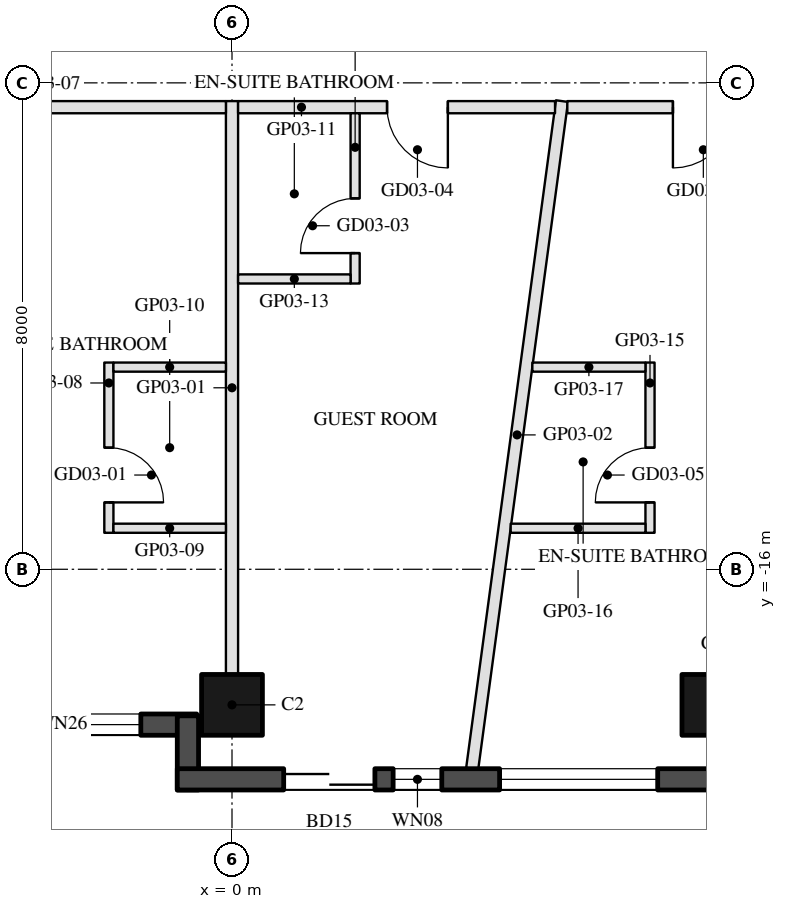
"""IFC4 building model, lengths in metres.
Left out: names, types, materials, properties, quantities, classifications, styles, units other than length and angle.
Written with IfcOpenShell. Run it as: python <this file> out.ifc"""

import sys

from ifc_helpers import new_model, si_unit, direction, frame, frame_2d, origin, origin_2d, place, context, subcontext, project, spatial, rectangle, hollow_rectangle, extrude, element, fill, save


model = new_model("IFC4")
c1 = context("Model", 3, precision=1e-05, world=origin(), true_north=direction((0.0, 1.0)))
c2 = subcontext(c1, "Body", "Model", "MODEL_VIEW")
j1 = project(units=[si_unit("LENGTHUNIT", "METRE"), si_unit("PLANEANGLEUNIT", "RADIAN")], contexts=[c1])
p1 = place(None, origin())
s1 = spatial("IfcSite", under=j1, at=p1, CompositionType="ELEMENT")
p2 = place(p1, origin())
s2 = spatial("IfcBuilding", under=s1, at=p2, CompositionType="ELEMENT")
p3 = place(p2, frame((0.0, 0.0, 68.7)))
s3 = spatial("IfcBuildingStorey", under=s2, at=p3, CompositionType="ELEMENT", Elevation=68.7)
for number, where, z_axis, x_axis in (
    (1, (0.0, -18.23, 0.0), (0.0, 0.0, 1.0), (-1.0, 0.0, 0.0)),
    (2, (7.9, -18.23, 0.0), (0.0, 0.0, 1.0), (-1.0, 0.0, 0.0)),
):
    element("IfcColumn", number, at=place(p3, frame(where, z_axis=z_axis, x_axis=x_axis)), inside=s3, PredefinedType="COLUMN", context=c2, shape_type="SweptSolid", body=[
        extrude(hollow_rectangle(XDim=1.0, YDim=1.0, WallThickness=0.045, at=origin_2d()), origin(), (0.0, 0.0, 1.0), 3.7),
    ])
p4 = place(p3, frame((-7.32, -18.555, 0.0), z_axis=(0.0, 0.0, 1.0), x_axis=(1.0, 0.0, 0.0)))
e3 = element("IfcWall", 3, at=p4, inside=s3, PredefinedType="SOLIDWALL", context=c2, shape_type="SweptSolid", body=[
    extrude(rectangle(XDim=6.74, YDim=0.35, at=frame_2d((3.37, 0.0))), origin(), (0.0, 0.0, 1.0), 3.55),
])
p5 = place(p4, frame((0.32, 0.0, 0.3)))
e4 = element("IfcOpeningElement", 4, at=p5, cuts=e3, PredefinedType="OPENING", context=c2, shape_type="SweptSolid", body=[
    extrude(rectangle(XDim=2.6, YDim=2.65, at=frame_2d((1.3, 1.325))), frame((0.0, 0.185, 0.0), z_axis=(0.0, -1.0, 0.0), x_axis=(1.0, 0.0, 0.0)), (0.0, 0.0, 1.0), 0.37),
])
p6 = place(p4, frame((3.22, 0.0, 0.3)))
e5 = element("IfcOpeningElement", 5, at=p6, cuts=e3, PredefinedType="OPENING", context=c2, shape_type="SweptSolid", body=[
    extrude(rectangle(XDim=2.6, YDim=2.65, at=frame_2d((1.3, 1.325))), frame((0.0, 0.185, 0.0), z_axis=(0.0, -1.0, 0.0), x_axis=(1.0, 0.0, 0.0)), (0.0, 0.0, 1.0), 0.37),
])
p7 = place(p3, frame((-0.725, -18.41, 0.0), z_axis=(0.0, 0.0, 1.0), x_axis=(0.0, -1.0, 0.0)))
e6 = element("IfcWall", 6, at=p7, inside=s3, PredefinedType="SOLIDWALL", context=c2, shape_type="SweptSolid", body=[
    extrude(rectangle(XDim=1.22, YDim=0.35, at=frame_2d((0.61, 0.0))), origin(), (0.0, 0.0, 1.0), 3.55),
])
p8 = place(p3, frame((-0.9, -19.455, 0.0), z_axis=(0.0, 0.0, 1.0), x_axis=(1.0, 0.0, 0.0)))
e7 = element("IfcWall", 7, at=p8, inside=s3, PredefinedType="SOLIDWALL", context=c2, shape_type="SweptSolid", body=[
    extrude(rectangle(XDim=9.7, YDim=0.35, at=frame_2d((4.85, 0.0))), origin(), (0.0, 0.0, 1.0), 3.55),
])
p9 = place(p8, frame((1.75, 0.0, 0.0)))
e8 = element("IfcOpeningElement", 8, at=p9, cuts=e7, PredefinedType="OPENING", context=c2, shape_type="SweptSolid", body=[
    extrude(rectangle(XDim=1.5, YDim=2.4, at=frame_2d((0.75, 1.2))), frame((0.0, 0.185, 0.0), z_axis=(0.0, -1.0, 0.0), x_axis=(1.0, 0.0, 0.0)), (0.0, 0.0, 1.0), 0.37),
])
p10 = place(p8, frame((3.55, 0.0, 0.3)))
e9 = element("IfcOpeningElement", 9, at=p10, cuts=e7, PredefinedType="OPENING", context=c2, shape_type="SweptSolid", body=[
    extrude(rectangle(XDim=0.8, YDim=2.65, at=frame_2d((0.4, 1.325))), frame((0.0, 0.185, 0.0), z_axis=(0.0, -1.0, 0.0), x_axis=(1.0, 0.0, 0.0)), (0.0, 0.0, 1.0), 0.37),
])
p11 = place(p8, frame((5.301, 0.0, 0.3)))
e10 = element("IfcOpeningElement", 10, at=p11, cuts=e7, PredefinedType="OPENING", context=c2, shape_type="SweptSolid", body=[
    extrude(rectangle(XDim=2.6, YDim=2.65, at=frame_2d((1.3, 1.325))), frame((0.0, 0.185, 0.0), z_axis=(0.0, -1.0, 0.0), x_axis=(1.0, 0.0, 0.0)), (0.0, 0.0, 1.0), 0.37),
])
p12 = place(p3, frame((0.0, -17.73, 0.0), z_axis=(0.0, 0.0, 1.0), x_axis=(0.0, 1.0, 0.0)))
e11 = element("IfcWall", 11, at=p12, inside=s3, PredefinedType="PARTITIONING", context=c2, shape_type="SweptSolid", body=[
    extrude(rectangle(XDim=9.43, YDim=0.2, at=frame_2d((4.715, 0.0))), origin(), (0.0, 0.0, 1.0), 2.95),
])
p13 = place(p3, frame((3.95, -19.28, 0.0), z_axis=(0.0, 0.0, 1.0), x_axis=(0.133321271807, 0.991072872439, 0.0)))
e12 = element("IfcWall", 12, at=p13, inside=s3, PredefinedType="PARTITIONING", context=c2, shape_type="SweptSolid", body=[
    extrude(rectangle(XDim=11.079, YDim=0.2, at=frame_2d((5.54, 0.0))), origin(), (0.0, 0.0, 1.0), 2.95),
])
p14 = place(p3, frame((-0.1, -8.4, 0.0), z_axis=(0.0, 0.0, 1.0), x_axis=(-1.0, 0.0, 0.0)))
e13 = element("IfcWall", 13, at=p14, inside=s3, PredefinedType="PARTITIONING", context=c2, shape_type="SweptSolid", body=[
    extrude(rectangle(XDim=9.888, YDim=0.2, at=frame_2d((4.944, 0.0))), origin(), (0.0, 0.0, 1.0), 2.95),
])
p15 = place(p14, frame((4.444, 0.0, 0.0)))
e14 = element("IfcOpeningElement", 14, at=p15, cuts=e13, PredefinedType="OPENING", context=c2, shape_type="SweptSolid", body=[
    extrude(rectangle(XDim=1.0, YDim=2.1, at=frame_2d((0.5, 1.05))), frame((0.0, 0.11, 0.0), z_axis=(0.0, -1.0, 0.0), x_axis=(1.0, 0.0, 0.0)), (0.0, 0.0, 1.0), 0.22),
])
p16 = place(p3, frame((-2.025, -12.6, 0.0), z_axis=(0.0, 0.0, 1.0), x_axis=(0.0, -1.0, 0.0)))
e15 = element("IfcWall", 15, at=p16, inside=s3, PredefinedType="PARTITIONING", context=c2, shape_type="SweptSolid", body=[
    extrude(rectangle(XDim=2.8, YDim=0.15, at=frame_2d((1.4, 0.0))), origin(), (0.0, 0.0, 1.0), 3.55),
])
p17 = place(p16, frame((1.4, 0.0, 0.0)))
e16 = element("IfcOpeningElement", 16, at=p17, cuts=e15, PredefinedType="OPENING", context=c2, shape_type="SweptSolid", body=[
    extrude(rectangle(XDim=0.9, YDim=2.1, at=frame_2d((0.45, 1.05))), frame((0.0, 0.085, 0.0), z_axis=(0.0, -1.0, 0.0), x_axis=(1.0, 0.0, 0.0)), (0.0, 0.0, 1.0), 0.17),
])
for number, where, z_axis, x_axis in (
    (17, (-1.95, -15.325, 0.0), (0.0, 0.0, 1.0), (1.0, 0.0, 0.0)),
    (18, (-1.95, -12.675, 0.0), (0.0, 0.0, 1.0), (1.0, 0.0, 0.0)),
):
    element("IfcWall", number, at=place(p3, frame(where, z_axis=z_axis, x_axis=x_axis)), inside=s3, PredefinedType="PARTITIONING", context=c2, shape_type="SweptSolid", body=[
        extrude(rectangle(XDim=1.85, YDim=0.15, at=frame_2d((0.925, 0.0))), origin(), (0.0, 0.0, 1.0), 2.95),
    ])
p18 = place(p3, frame((5.312, -8.4, 0.0), z_axis=(0.0, 0.0, 1.0), x_axis=(-1.0, 0.0, 0.0)))
e19 = element("IfcWall", 19, at=p18, inside=s3, PredefinedType="PARTITIONING", context=c2, shape_type="SweptSolid", body=[
    extrude(rectangle(XDim=5.212, YDim=0.2, at=frame_2d((2.606, 0.0))), origin(), (0.0, 0.0, 1.0), 2.95),
])
p19 = place(p18, frame((1.763, 0.0, 0.0)))
e20 = element("IfcOpeningElement", 20, at=p19, cuts=e19, PredefinedType="OPENING", context=c2, shape_type="SweptSolid", body=[
    extrude(rectangle(XDim=1.0, YDim=2.1, at=frame_2d((0.5, 1.05))), frame((0.0, 0.11, 0.0), z_axis=(0.0, -1.0, 0.0), x_axis=(1.0, 0.0, 0.0)), (0.0, 0.0, 1.0), 0.22),
])
p20 = place(p3, frame((2.025, -11.3, 0.0), z_axis=(0.0, 0.0, 1.0), x_axis=(0.0, 1.0, 0.0)))
e21 = element("IfcWall", 21, at=p20, inside=s3, PredefinedType="PARTITIONING", context=c2, shape_type="SweptSolid", body=[
    extrude(rectangle(XDim=2.8, YDim=0.15, at=frame_2d((1.4, 0.0))), origin(), (0.0, 0.0, 1.0), 3.55),
])
p21 = place(p20, frame((0.5, 0.0, 0.0)))
e22 = element("IfcOpeningElement", 22, at=p21, cuts=e21, PredefinedType="OPENING", context=c2, shape_type="SweptSolid", body=[
    extrude(rectangle(XDim=0.9, YDim=2.1, at=frame_2d((0.45, 1.05))), frame((0.0, 0.085, 0.0), z_axis=(0.0, -1.0, 0.0), x_axis=(1.0, 0.0, 0.0)), (0.0, 0.0, 1.0), 0.17),
])
p22 = place(p3, frame((0.1, -11.225, 0.0), z_axis=(0.0, 0.0, 1.0), x_axis=(1.0, 0.0, 0.0)))
e23 = element("IfcWall", 23, at=p22, inside=s3, PredefinedType="PARTITIONING", context=c2, shape_type="SweptSolid", body=[
    extrude(rectangle(XDim=1.85, YDim=0.15, at=frame_2d((0.925, 0.0))), origin(), (0.0, 0.0, 1.0), 2.95),
])
p23 = place(p3, frame((9.988, -8.4, 0.0), z_axis=(0.0, 0.0, 1.0), x_axis=(-1.0, 0.0, 0.0)))
e24 = element("IfcWall", 24, at=p23, inside=s3, PredefinedType="PARTITIONING", context=c2, shape_type="SweptSolid", body=[
    extrude(rectangle(XDim=4.474, YDim=0.2, at=frame_2d((2.237, 0.0))), origin(), (0.0, 0.0, 1.0), 2.95),
])
p24 = place(p23, frame((1.737, 0.0, 0.0)))
e25 = element("IfcOpeningElement", 25, at=p24, cuts=e24, PredefinedType="OPENING", context=c2, shape_type="SweptSolid", body=[
    extrude(rectangle(XDim=1.0, YDim=2.1, at=frame_2d((0.5, 1.05))), frame((0.0, 0.11, 0.0), z_axis=(0.0, -1.0, 0.0), x_axis=(1.0, 0.0, 0.0)), (0.0, 0.0, 1.0), 0.22),
])
p25 = place(p3, frame((6.875, -15.4, 0.0), z_axis=(0.0, 0.0, 1.0), x_axis=(0.0, 1.0, 0.0)))
e26 = element("IfcWall", 26, at=p25, inside=s3, PredefinedType="PARTITIONING", context=c2, shape_type="SweptSolid", body=[
    extrude(rectangle(XDim=2.8, YDim=0.15, at=frame_2d((1.4, 0.0))), origin(), (0.0, 0.0, 1.0), 3.55),
])
p26 = place(p25, frame((0.5, 0.0, 0.0)))
e27 = element("IfcOpeningElement", 27, at=p26, cuts=e26, PredefinedType="OPENING", context=c2, shape_type="SweptSolid", body=[
    extrude(rectangle(XDim=0.9, YDim=2.1, at=frame_2d((0.45, 1.05))), frame((0.0, 0.085, 0.0), z_axis=(0.0, -1.0, 0.0), x_axis=(1.0, 0.0, 0.0)), (0.0, 0.0, 1.0), 0.17),
])
p27 = place(p3, frame((4.583, -15.325, 0.0), z_axis=(0.0, 0.0, 1.0), x_axis=(1.0, 0.0, 0.0)))
e28 = element("IfcWall", 28, at=p27, inside=s3, PredefinedType="PARTITIONING", context=c2, shape_type="SweptSolid", body=[
    extrude(rectangle(XDim=2.216, YDim=0.15, at=frame_2d((1.108, 0.0))), origin(), (0.0, 0.0, 1.0), 3.55),
])
p28 = place(p3, frame((4.939, -12.675, 0.0), z_axis=(0.0, 0.0, 1.0), x_axis=(1.0, 0.0, 0.0)))
e29 = element("IfcWall", 29, at=p28, inside=s3, PredefinedType="PARTITIONING", context=c2, shape_type="SweptSolid", body=[
    extrude(rectangle(XDim=1.86, YDim=0.15, at=frame_2d((0.93, 0.0))), origin(), (0.0, 0.0, 1.0), 3.55),
])
p29 = place(p6, origin())
e30 = element("IfcWindow", 30, at=p29, inside=s3, PartitioningType="SINGLE_PANEL", PredefinedType="WINDOW", context=c2, shape_type="SweptSolid", body=[
    extrude(rectangle(XDim=2.6, YDim=2.65, at=frame_2d((1.3, 1.325))), frame((0.0, 0.03, 0.0), z_axis=(0.0, -1.0, 0.0), x_axis=(1.0, 0.0, 0.0)), (0.0, 0.0, 1.0), 0.06),
])
fill(e5, e30)
p30 = place(p9, frame((1.5, 0.0, 0.0), z_axis=(0.0, 0.0, 1.0), x_axis=(-1.0, 0.0, 0.0)))
e31 = element("IfcDoor", 31, at=p30, inside=s3, OperationType="SLIDING_TO_LEFT", PredefinedType="DOOR", context=c2, shape_type="SweptSolid", body=[
    extrude(rectangle(XDim=1.5, YDim=2.4, at=frame_2d((0.75, 1.2))), frame((0.0, 0.025, 0.0), z_axis=(0.0, -1.0, 0.0), x_axis=(1.0, 0.0, 0.0)), (0.0, 0.0, 1.0), 0.05),
])
fill(e8, e31)
p31 = place(p10, origin())
e32 = element("IfcWindow", 32, at=p31, inside=s3, PartitioningType="SINGLE_PANEL", PredefinedType="WINDOW", context=c2, shape_type="SweptSolid", body=[
    extrude(rectangle(XDim=0.8, YDim=2.65, at=frame_2d((0.4, 1.325))), frame((0.0, 0.03, 0.0), z_axis=(0.0, -1.0, 0.0), x_axis=(1.0, 0.0, 0.0)), (0.0, 0.0, 1.0), 0.06),
])
fill(e9, e32)
p32 = place(p11, origin())
e33 = element("IfcWindow", 33, at=p32, inside=s3, PartitioningType="SINGLE_PANEL", PredefinedType="WINDOW", context=c2, shape_type="SweptSolid", body=[
    extrude(rectangle(XDim=2.6, YDim=2.65, at=frame_2d((1.3, 1.325))), frame((0.0, 0.03, 0.0), z_axis=(0.0, -1.0, 0.0), x_axis=(1.0, 0.0, 0.0)), (0.0, 0.0, 1.0), 0.06),
])
fill(e10, e33)
p33 = place(p17, origin())
e34 = element("IfcDoor", 34, at=p33, inside=s3, OperationType="SINGLE_SWING_RIGHT", PredefinedType="DOOR", context=c2, shape_type="SweptSolid", body=[
    extrude(rectangle(XDim=0.9, YDim=2.1, at=frame_2d((0.45, 1.05))), frame((0.0, 0.025, 0.0), z_axis=(0.0, -1.0, 0.0), x_axis=(1.0, 0.0, 0.0)), (0.0, 0.0, 1.0), 0.05),
])
fill(e16, e34)
p34 = place(p21, origin())
e35 = element("IfcDoor", 35, at=p34, inside=s3, OperationType="SINGLE_SWING_LEFT", PredefinedType="DOOR", context=c2, shape_type="SweptSolid", body=[
    extrude(rectangle(XDim=0.9, YDim=2.1, at=frame_2d((0.45, 1.05))), frame((0.0, 0.025, 0.0), z_axis=(0.0, -1.0, 0.0), x_axis=(1.0, 0.0, 0.0)), (0.0, 0.0, 1.0), 0.05),
])
fill(e22, e35)
p35 = place(p19, origin())
e36 = element("IfcDoor", 36, at=p35, inside=s3, OperationType="SINGLE_SWING_LEFT", PredefinedType="DOOR", context=c2, shape_type="SweptSolid", body=[
    extrude(rectangle(XDim=1.0, YDim=2.1, at=frame_2d((0.5, 1.05))), frame((0.0, 0.025, 0.0), z_axis=(0.0, -1.0, 0.0), x_axis=(1.0, 0.0, 0.0)), (0.0, 0.0, 1.0), 0.05),
])
fill(e20, e36)
p36 = place(p26, origin())
e37 = element("IfcDoor", 37, at=p36, inside=s3, OperationType="SINGLE_SWING_LEFT", PredefinedType="DOOR", context=c2, shape_type="SweptSolid", body=[
    extrude(rectangle(XDim=0.9, YDim=2.1, at=frame_2d((0.45, 1.05))), frame((0.0, 0.025, 0.0), z_axis=(0.0, -1.0, 0.0), x_axis=(1.0, 0.0, 0.0)), (0.0, 0.0, 1.0), 0.05),
])
fill(e27, e37)
p37 = place(p24, origin())
e38 = element("IfcDoor", 38, at=p37, inside=s3, OperationType="SINGLE_SWING_RIGHT", PredefinedType="DOOR", context=c2, shape_type="SweptSolid", body=[
    extrude(rectangle(XDim=1.0, YDim=2.1, at=frame_2d((0.5, 1.05))), frame((0.0, 0.025, 0.0), z_axis=(0.0, -1.0, 0.0), x_axis=(1.0, 0.0, 0.0)), (0.0, 0.0, 1.0), 0.05),
])
fill(e25, e38)
save(model, sys.argv[1])
